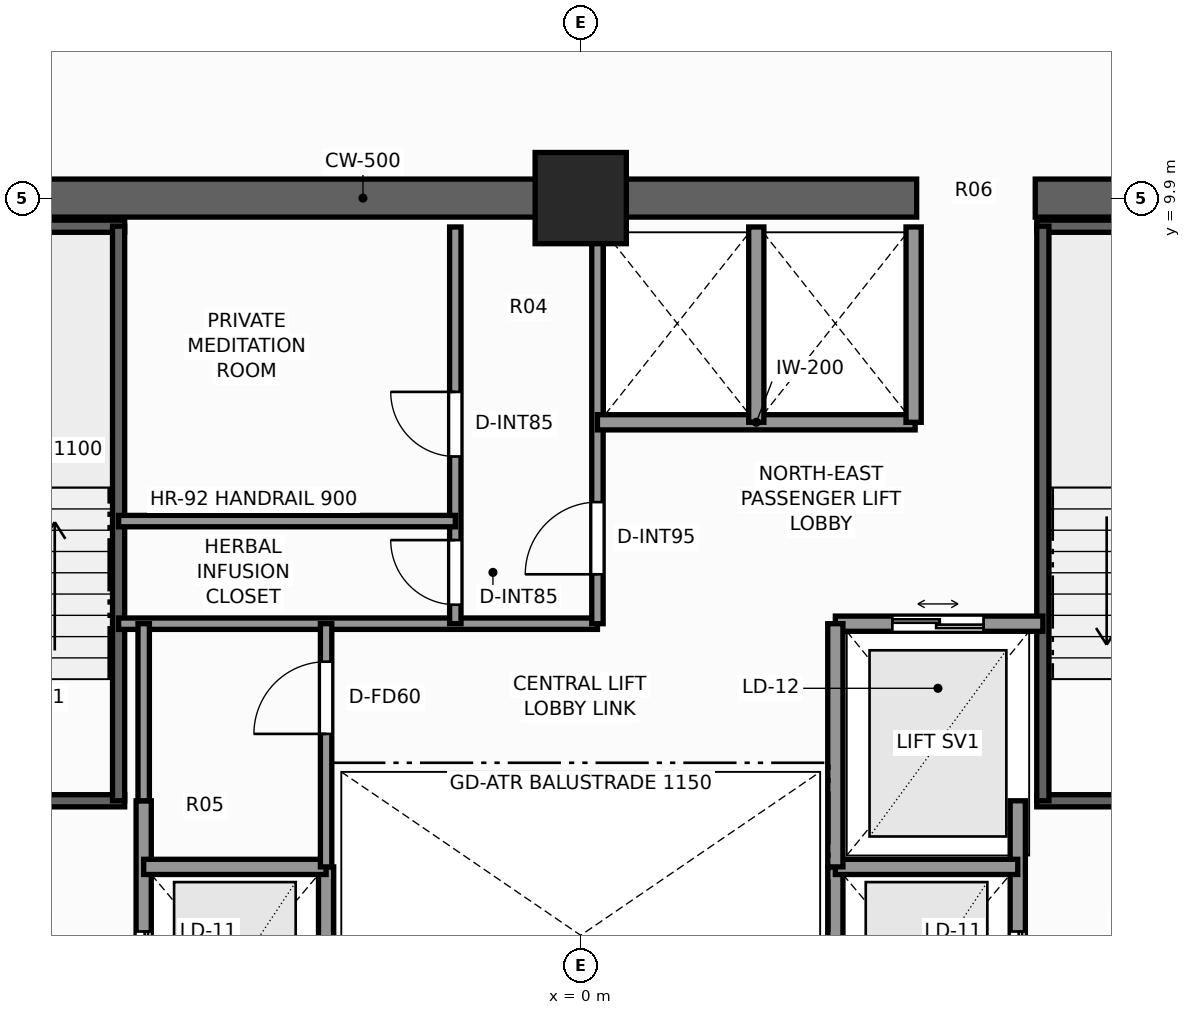
"""IFC4 building model, lengths in metres.
Left out: names, types, materials, properties, quantities, classifications, styles, units other than length and angle.
Written with IfcOpenShell. Run it as: python <this file> out.ifc"""

import sys

from ifc_helpers import new_model, si_unit, direction, frame, frame_2d, origin, origin_2d, place, context, subcontext, project, spatial, rectangle, extrude, element, fill, save


model = new_model("IFC4")
c1 = context("Model", 3, precision=1e-05, world=origin(), true_north=direction((0.0, 1.0)))
c2 = subcontext(c1, "Body", "Model", "MODEL_VIEW")
j1 = project(units=[si_unit("LENGTHUNIT", "METRE"), si_unit("PLANEANGLEUNIT", "RADIAN")], contexts=[c1])
p1 = place(None, origin())
s1 = spatial("IfcSite", under=j1, at=p1, CompositionType="ELEMENT")
p2 = place(p1, origin())
s2 = spatial("IfcBuilding", under=s1, at=p2, CompositionType="ELEMENT")
p3 = place(p2, frame((0.0, 0.0, 170.1)))
s3 = spatial("IfcBuildingStorey", under=s2, at=p3, CompositionType="ELEMENT", Elevation=170.1)
p4 = place(p3, frame((-10.15, 9.9, 0.0), z_axis=(0.0, 0.0, 1.0), x_axis=(1.0, 0.0, 0.0)))
e1 = element("IfcWall", 1, at=p4, inside=s3, PredefinedType="SHEAR", context=c2, shape_type="SweptSolid", body=[
    extrude(rectangle(XDim=14.57, YDim=0.5, at=frame_2d((7.285, 0.0))), origin(), (0.0, 0.0, 1.0), 3.3),
])
p5 = place(p3, frame((5.98, 9.9, 0.0), z_axis=(0.0, 0.0, 1.0), x_axis=(1.0, 0.0, 0.0)))
e2 = element("IfcWall", 2, at=p5, inside=s3, PredefinedType="SHEAR", context=c2, shape_type="SweptSolid", body=[
    extrude(rectangle(XDim=4.17, YDim=0.5, at=frame_2d((2.085, 0.0))), origin(), (0.0, 0.0, 1.0), 3.3),
])
p6 = place(p3, frame((0.0, 9.9, 0.0), z_axis=(0.0, 0.0, 1.0), x_axis=(1.0, 0.0, 0.0)))
e3 = element("IfcColumn", 3, at=p6, inside=s3, PredefinedType="COLUMN", context=c2, shape_type="SweptSolid", body=[
    extrude(rectangle(XDim=1.2, YDim=1.2, at=origin_2d()), origin(), (0.0, 0.0, 1.0), 3.3),
])
p7 = place(p3, frame((-9.52, 1.97, 0.0), z_axis=(0.0, 0.0, 1.0), x_axis=(1.0, 0.0, 0.0)))
e4 = element("IfcWall", 4, at=p7, inside=s3, PredefinedType="SHEAR", context=c2, shape_type="SweptSolid", body=[
    extrude(rectangle(XDim=3.52, YDim=0.16, at=frame_2d((1.76, 0.0))), origin(), (0.0, 0.0, 1.0), 3.3),
])
p8 = place(p7, frame((1.15, 0.0, 0.0)))
e5 = element("IfcOpeningElement", 5, at=p8, cuts=e4, PredefinedType="OPENING", context=c2, shape_type="SweptSolid", body=[
    extrude(rectangle(XDim=1.1, YDim=2.2, at=frame_2d((0.55, 1.1))), frame((0.0, 0.09, 0.0), z_axis=(0.0, -1.0, 0.0), x_axis=(1.0, 0.0, 0.0)), (0.0, 0.0, 1.0), 0.18),
])
p9 = place(p3, frame((-9.52, 9.53, 0.0), z_axis=(0.0, 0.0, 1.0), x_axis=(1.0, 0.0, 0.0)))
e6 = element("IfcWall", 6, at=p9, inside=s3, PredefinedType="SHEAR", context=c2, shape_type="SweptSolid", body=[
    extrude(rectangle(XDim=3.52, YDim=0.16, at=frame_2d((1.76, 0.0))), origin(), (0.0, 0.0, 1.0), 3.3),
])
p10 = place(p3, frame((-6.08, 1.97, 0.0), z_axis=(0.0, 0.0, 1.0), x_axis=(0.0, 1.0, 0.0)))
e7 = element("IfcWall", 7, at=p10, inside=s3, PredefinedType="SHEAR", context=c2, shape_type="SweptSolid", body=[
    extrude(rectangle(XDim=7.56, YDim=0.16, at=frame_2d((3.78, 0.0))), origin(), (0.0, 0.0, 1.0), 3.3),
])
p11 = place(p3, frame((6.0, 1.97, 0.0), z_axis=(0.0, 0.0, 1.0), x_axis=(1.0, 0.0, 0.0)))
e8 = element("IfcWall", 8, at=p11, inside=s3, PredefinedType="SHEAR", context=c2, shape_type="SweptSolid", body=[
    extrude(rectangle(XDim=3.52, YDim=0.16, at=frame_2d((1.76, 0.0))), origin(), (0.0, 0.0, 1.0), 3.3),
])
p12 = place(p11, frame((1.15, 0.0, 0.0)))
e9 = element("IfcOpeningElement", 9, at=p12, cuts=e8, PredefinedType="OPENING", context=c2, shape_type="SweptSolid", body=[
    extrude(rectangle(XDim=1.1, YDim=2.2, at=frame_2d((0.55, 1.1))), frame((0.0, 0.09, 0.0), z_axis=(0.0, -1.0, 0.0), x_axis=(1.0, 0.0, 0.0)), (0.0, 0.0, 1.0), 0.18),
])
p13 = place(p3, frame((6.0, 9.53, 0.0), z_axis=(0.0, 0.0, 1.0), x_axis=(1.0, 0.0, 0.0)))
e10 = element("IfcWall", 10, at=p13, inside=s3, PredefinedType="SHEAR", context=c2, shape_type="SweptSolid", body=[
    extrude(rectangle(XDim=3.52, YDim=0.16, at=frame_2d((1.76, 0.0))), origin(), (0.0, 0.0, 1.0), 3.3),
])
p14 = place(p3, frame((6.08, 1.97, 0.0), z_axis=(0.0, 0.0, 1.0), x_axis=(0.0, 1.0, 0.0)))
e11 = element("IfcWall", 11, at=p14, inside=s3, PredefinedType="SHEAR", context=c2, shape_type="SweptSolid", body=[
    extrude(rectangle(XDim=7.56, YDim=0.16, at=frame_2d((3.78, 0.0))), origin(), (0.0, 0.0, 1.0), 3.3),
])
p15 = place(p3, frame((-5.75, -3.6, 0.0), z_axis=(0.0, 0.0, 1.0), x_axis=(0.0, 1.0, 0.0)))
e12 = element("IfcWall", 12, at=p15, inside=s3, PredefinedType="SOLIDWALL", context=c2, shape_type="SweptSolid", body=[
    extrude(rectangle(XDim=5.57, YDim=0.2, at=frame_2d((2.785, 0.0))), origin(), (0.0, 0.0, 1.0), 2.715),
])
p16 = place(p15, frame((2.75, 0.0, 0.0)))
e13 = element("IfcOpeningElement", 13, at=p16, cuts=e12, PredefinedType="OPENING", context=c2, shape_type="SweptSolid", body=[
    extrude(rectangle(XDim=1.1, YDim=2.2, at=frame_2d((0.55, 1.1))), frame((0.0, 0.11, 0.0), z_axis=(0.0, -1.0, 0.0), x_axis=(1.0, 0.0, 0.0)), (0.0, 0.0, 1.0), 0.22),
])
p17 = place(p3, frame((-3.35, -1.7, 0.0), z_axis=(0.0, 0.0, 1.0), x_axis=(0.0, 1.0, 0.0)))
e14 = element("IfcWall", 14, at=p17, inside=s3, PredefinedType="SOLIDWALL", context=c2, shape_type="SweptSolid", body=[
    extrude(rectangle(XDim=2.8, YDim=0.2, at=frame_2d((1.4, 0.0))), origin(), (0.0, 0.0, 1.0), 2.715),
])
p18 = place(p3, frame((-5.75, 1.1, 0.0), z_axis=(0.0, 0.0, 1.0), x_axis=(1.0, 0.0, 0.0)))
e15 = element("IfcWall", 15, at=p18, inside=s3, PredefinedType="SOLIDWALL", context=c2, shape_type="SweptSolid", body=[
    extrude(rectangle(XDim=2.4, YDim=0.2, at=frame_2d((1.2, 0.0))), origin(), (0.0, 0.0, 1.0), 3.08),
])
p19 = place(p3, frame((5.75, -3.6, 0.0), z_axis=(0.0, 0.0, 1.0), x_axis=(0.0, 1.0, 0.0)))
e16 = element("IfcWall", 16, at=p19, inside=s3, PredefinedType="SOLIDWALL", context=c2, shape_type="SweptSolid", body=[
    extrude(rectangle(XDim=5.57, YDim=0.2, at=frame_2d((2.785, 0.0))), origin(), (0.0, 0.0, 1.0), 2.715),
])
p20 = place(p19, frame((2.75, 0.0, 0.0)))
e17 = element("IfcOpeningElement", 17, at=p20, cuts=e16, PredefinedType="OPENING", context=c2, shape_type="SweptSolid", body=[
    extrude(rectangle(XDim=1.1, YDim=2.2, at=frame_2d((0.55, 1.1))), frame((0.0, 0.11, 0.0), z_axis=(0.0, -1.0, 0.0), x_axis=(1.0, 0.0, 0.0)), (0.0, 0.0, 1.0), 0.22),
])
p21 = place(p3, frame((3.35, -1.7, 0.0), z_axis=(0.0, 0.0, 1.0), x_axis=(0.0, 1.0, 0.0)))
e18 = element("IfcWall", 18, at=p21, inside=s3, PredefinedType="SOLIDWALL", context=c2, shape_type="SweptSolid", body=[
    extrude(rectangle(XDim=2.8, YDim=0.2, at=frame_2d((1.4, 0.0))), origin(), (0.0, 0.0, 1.0), 2.715),
])
p22 = place(p3, frame((3.35, 1.1, 0.0), z_axis=(0.0, 0.0, 1.0), x_axis=(1.0, 0.0, 0.0)))
e19 = element("IfcWall", 19, at=p22, inside=s3, PredefinedType="SOLIDWALL", context=c2, shape_type="SweptSolid", body=[
    extrude(rectangle(XDim=2.4, YDim=0.2, at=frame_2d((1.2, 0.0))), origin(), (0.0, 0.0, 1.0), 3.08),
])
p23 = place(p3, frame((3.35, 4.3, 0.0), z_axis=(0.0, 0.0, 1.0), x_axis=(1.0, 0.0, 0.0)))
e20 = element("IfcWall", 20, at=p23, inside=s3, PredefinedType="SOLIDWALL", context=c2, shape_type="SweptSolid", body=[
    extrude(rectangle(XDim=2.73, YDim=0.2, at=frame_2d((1.365, 0.0))), origin(), (0.0, 0.0, 1.0), 3.08),
])
p24 = place(p23, frame((0.75, 0.0, 0.0)))
e21 = element("IfcOpeningElement", 21, at=p24, cuts=e20, PredefinedType="OPENING", context=c2, shape_type="SweptSolid", body=[
    extrude(rectangle(XDim=1.2, YDim=2.25, at=frame_2d((0.6, 1.125))), frame((0.0, 0.11, 0.0), z_axis=(0.0, -1.0, 0.0), x_axis=(1.0, 0.0, 0.0)), (0.0, 0.0, 1.0), 0.22),
])
p25 = place(p3, frame((3.35, 1.1, 0.0), z_axis=(0.0, 0.0, 1.0), x_axis=(0.0, 1.0, 0.0)))
e22 = element("IfcWall", 22, at=p25, inside=s3, PredefinedType="SOLIDWALL", context=c2, shape_type="SweptSolid", body=[
    extrude(rectangle(XDim=3.2, YDim=0.2, at=frame_2d((1.6, 0.0))), origin(), (0.0, 0.0, 1.0), 2.715),
])
p26 = place(p3, frame((-6.08, 4.3, 0.0), z_axis=(0.0, 0.0, 1.0), x_axis=(1.0, 0.0, 0.0)))
e23 = element("IfcWall", 23, at=p26, inside=s3, PredefinedType="PARTITIONING", context=c2, shape_type="SweptSolid", body=[
    extrude(rectangle(XDim=6.3, YDim=0.15, at=frame_2d((3.15, 0.0))), origin(), (0.0, 0.0, 1.0), 3.08),
])
p27 = place(p3, frame((0.22, 4.3, 0.0), z_axis=(0.0, 0.0, 1.0), x_axis=(0.0, 1.0, 0.0)))
e24 = element("IfcWall", 24, at=p27, inside=s3, PredefinedType="PARTITIONING", context=c2, shape_type="SweptSolid", body=[
    extrude(rectangle(XDim=5.22, YDim=0.15, at=frame_2d((2.61, 0.0))), origin(), (0.0, 0.0, 1.0), 3.08),
])
p28 = place(p27, frame((0.65, 0.0, 0.0)))
e25 = element("IfcOpeningElement", 25, at=p28, cuts=e24, PredefinedType="OPENING", context=c2, shape_type="SweptSolid", body=[
    extrude(rectangle(XDim=0.95, YDim=2.06, at=frame_2d((0.475, 1.03))), frame((0.0, 0.085, 0.0), z_axis=(0.0, -1.0, 0.0), x_axis=(1.0, 0.0, 0.0)), (0.0, 0.0, 1.0), 0.17),
])
p29 = place(p3, frame((-1.65, 4.3, 0.0), z_axis=(0.0, 0.0, 1.0), x_axis=(0.0, 1.0, 0.0)))
e26 = element("IfcWall", 26, at=p29, inside=s3, PredefinedType="PARTITIONING", context=c2, shape_type="SweptSolid", body=[
    extrude(rectangle(XDim=5.22, YDim=0.15, at=frame_2d((2.61, 0.0))), origin(), (0.0, 0.0, 1.0), 3.08),
])
p30 = place(p29, frame((2.2, 0.0, 0.0)))
e27 = element("IfcOpeningElement", 27, at=p30, cuts=e26, PredefinedType="OPENING", context=c2, shape_type="SweptSolid", body=[
    extrude(rectangle(XDim=0.85, YDim=2.03, at=frame_2d((0.425, 1.015))), frame((0.0, 0.085, 0.0), z_axis=(0.0, -1.0, 0.0), x_axis=(1.0, 0.0, 0.0)), (0.0, 0.0, 1.0), 0.17),
])
p31 = place(p29, frame((0.25, 0.0, 0.0)))
e28 = element("IfcOpeningElement", 28, at=p31, cuts=e26, PredefinedType="OPENING", context=c2, shape_type="SweptSolid", body=[
    extrude(rectangle(XDim=0.85, YDim=2.03, at=frame_2d((0.425, 1.015))), frame((0.0, 0.085, 0.0), z_axis=(0.0, -1.0, 0.0), x_axis=(1.0, 0.0, 0.0)), (0.0, 0.0, 1.0), 0.17),
])
p32 = place(p3, frame((-6.08, 5.65, 0.0), z_axis=(0.0, 0.0, 1.0), x_axis=(1.0, 0.0, 0.0)))
e29 = element("IfcWall", 29, at=p32, inside=s3, PredefinedType="PARTITIONING", context=c2, shape_type="SweptSolid", body=[
    extrude(rectangle(XDim=4.43, YDim=0.15, at=frame_2d((2.215, 0.0))), origin(), (0.0, 0.0, 1.0), 3.08),
])
p33 = place(p3, frame((0.22, 6.95, 0.0), z_axis=(0.0, 0.0, 1.0), x_axis=(1.0, 0.0, 0.0)))
e30 = element("IfcWall", 30, at=p33, inside=s3, PredefinedType="SOLIDWALL", context=c2, shape_type="SweptSolid", body=[
    extrude(rectangle(XDim=4.18, YDim=0.2, at=frame_2d((2.09, 0.0))), origin(), (0.0, 0.0, 1.0), 3.08),
])
for number, where, z_axis, x_axis in (
    (31, (4.38, 6.95, 0.0), (0.0, 0.0, 1.0), (0.0, 1.0, 0.0)),
    (32, (2.31, 6.95, 0.0), (0.0, 0.0, 1.0), (0.0, 1.0, 0.0)),
):
    element("IfcWall", number, at=place(p3, frame(where, z_axis=z_axis, x_axis=x_axis)), inside=s3, PredefinedType="SOLIDWALL", context=c2, shape_type="SweptSolid", body=[
        extrude(rectangle(XDim=2.57, YDim=0.2, at=frame_2d((1.285, 0.0))), origin(), (0.0, 0.0, 1.0), 3.08),
    ])
p34 = place(p3, frame((-3.35, 1.1, 0.0), z_axis=(0.0, 0.0, 1.0), x_axis=(0.0, 1.0, 0.0)))
e33 = element("IfcWall", 33, at=p34, inside=s3, PredefinedType="PARTITIONING", context=c2, shape_type="SweptSolid", body=[
    extrude(rectangle(XDim=3.2, YDim=0.15, at=frame_2d((1.6, 0.0))), origin(), (0.0, 0.0, 1.0), 2.715),
])
p35 = place(p34, frame((1.75, 0.0, 0.0)))
e34 = element("IfcOpeningElement", 34, at=p35, cuts=e33, PredefinedType="OPENING", context=c2, shape_type="SweptSolid", body=[
    extrude(rectangle(XDim=0.95, YDim=2.06, at=frame_2d((0.475, 1.03))), frame((0.0, 0.085, 0.0), z_axis=(0.0, -1.0, 0.0), x_axis=(1.0, 0.0, 0.0)), (0.0, 0.0, 1.0), 0.17),
])
p36 = place(p3, frame((-5.75, 1.97, 0.0), z_axis=(0.0, 0.0, 1.0), x_axis=(0.0, 1.0, 0.0)))
e35 = element("IfcWall", 35, at=p36, inside=s3, PredefinedType="PARTITIONING", context=c2, shape_type="SweptSolid", body=[
    extrude(rectangle(XDim=2.33, YDim=0.15, at=frame_2d((1.165, 0.0))), origin(), (0.0, 0.0, 1.0), 2.715),
])
p37 = place(p16, origin())
e36 = element("IfcDoor", 36, at=p37, inside=s3, OperationType="DOUBLE_DOOR_SLIDING", PredefinedType="DOOR", context=c2, shape_type="SweptSolid", body=[
    extrude(rectangle(XDim=1.1, YDim=2.2, at=frame_2d((0.55, 1.1))), frame((0.0, 0.025, 0.0), z_axis=(0.0, -1.0, 0.0), x_axis=(1.0, 0.0, 0.0)), (0.0, 0.0, 1.0), 0.05),
])
fill(e13, e36)
p38 = place(p20, origin())
e37 = element("IfcDoor", 37, at=p38, inside=s3, OperationType="DOUBLE_DOOR_SLIDING", PredefinedType="DOOR", context=c2, shape_type="SweptSolid", body=[
    extrude(rectangle(XDim=1.1, YDim=2.2, at=frame_2d((0.55, 1.1))), frame((0.0, 0.025, 0.0), z_axis=(0.0, -1.0, 0.0), x_axis=(1.0, 0.0, 0.0)), (0.0, 0.0, 1.0), 0.05),
])
fill(e17, e37)
p39 = place(p24, origin())
e38 = element("IfcDoor", 38, at=p39, inside=s3, OperationType="DOUBLE_DOOR_SLIDING", PredefinedType="DOOR", context=c2, shape_type="SweptSolid", body=[
    extrude(rectangle(XDim=1.2, YDim=2.25, at=frame_2d((0.6, 1.125))), frame((0.0, 0.025, 0.0), z_axis=(0.0, -1.0, 0.0), x_axis=(1.0, 0.0, 0.0)), (0.0, 0.0, 1.0), 0.05),
])
fill(e21, e38)
p40 = place(p28, origin())
e39 = element("IfcDoor", 39, at=p40, inside=s3, OperationType="SINGLE_SWING_LEFT", PredefinedType="DOOR", context=c2, shape_type="SweptSolid", body=[
    extrude(rectangle(XDim=0.95, YDim=2.06, at=frame_2d((0.475, 1.03))), frame((0.0, 0.025, 0.0), z_axis=(0.0, -1.0, 0.0), x_axis=(1.0, 0.0, 0.0)), (0.0, 0.0, 1.0), 0.05),
])
fill(e25, e39)
p41 = place(p30, origin())
e40 = element("IfcDoor", 40, at=p41, inside=s3, OperationType="SINGLE_SWING_RIGHT", PredefinedType="DOOR", context=c2, shape_type="SweptSolid", body=[
    extrude(rectangle(XDim=0.85, YDim=2.03, at=frame_2d((0.425, 1.015))), frame((0.0, 0.025, 0.0), z_axis=(0.0, -1.0, 0.0), x_axis=(1.0, 0.0, 0.0)), (0.0, 0.0, 1.0), 0.05),
])
fill(e27, e40)
p42 = place(p31, origin())
e41 = element("IfcDoor", 41, at=p42, inside=s3, OperationType="SINGLE_SWING_RIGHT", PredefinedType="DOOR", context=c2, shape_type="SweptSolid", body=[
    extrude(rectangle(XDim=0.85, YDim=2.03, at=frame_2d((0.425, 1.015))), frame((0.0, 0.025, 0.0), z_axis=(0.0, -1.0, 0.0), x_axis=(1.0, 0.0, 0.0)), (0.0, 0.0, 1.0), 0.05),
])
fill(e28, e41)
p43 = place(p35, origin())
e42 = element("IfcDoor", 42, at=p43, inside=s3, OperationType="SINGLE_SWING_LEFT", PredefinedType="DOOR", context=c2, shape_type="SweptSolid", body=[
    extrude(rectangle(XDim=0.95, YDim=2.06, at=frame_2d((0.475, 1.03))), frame((0.0, 0.025, 0.0), z_axis=(0.0, -1.0, 0.0), x_axis=(1.0, 0.0, 0.0)), (0.0, 0.0, 1.0), 0.05),
])
fill(e34, e42)
save(model, sys.argv[1])
